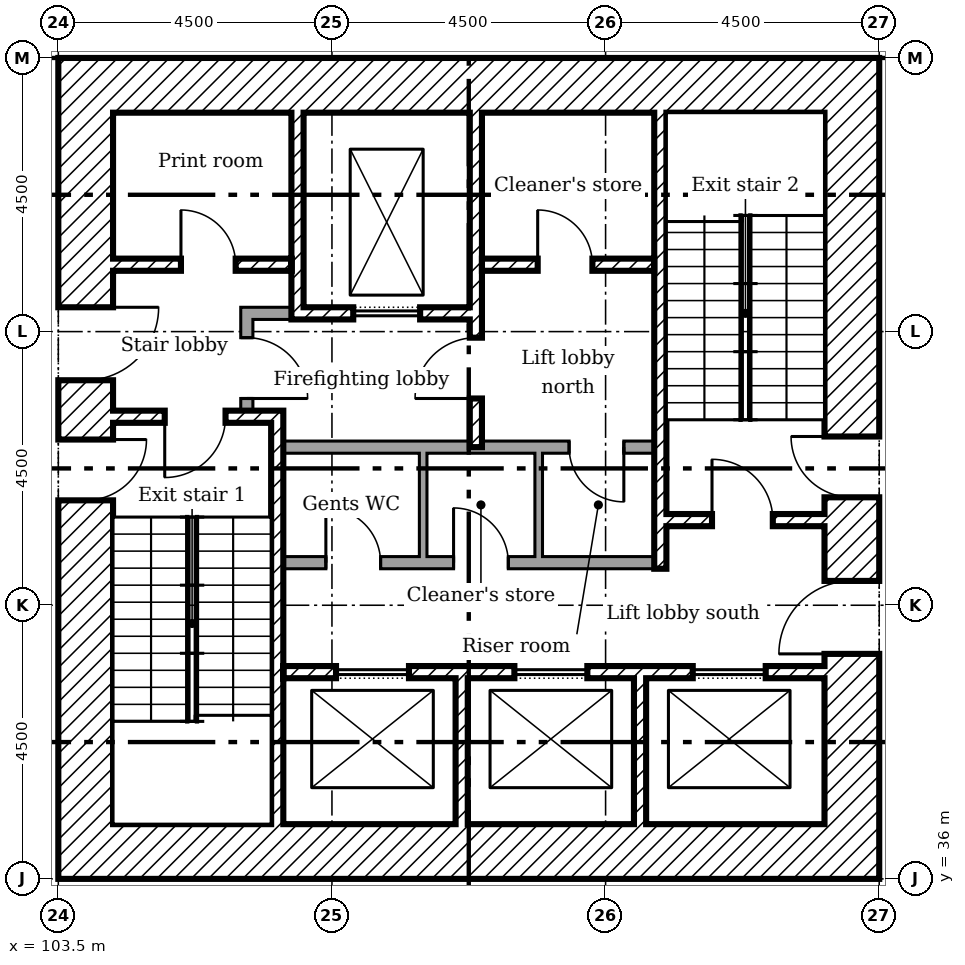
"""IFC4 building model, lengths in metres.
Left out: names, types, materials, properties, quantities, classifications, styles, units other than length and angle.
Written with IfcOpenShell. Run it as: python <this file> out.ifc"""

import sys

from ifc_helpers import new_model, si_unit, direction, frame, frame_2d, origin, place, context, subcontext, project, spatial, rectangle, extrude, element, fill, save


model = new_model("IFC4")
c1 = context("Model", 3, precision=1e-05, world=origin(), true_north=direction((0.0, 1.0)))
c2 = subcontext(c1, "Body", "Model", "MODEL_VIEW")
j1 = project(units=[si_unit("LENGTHUNIT", "METRE"), si_unit("PLANEANGLEUNIT", "RADIAN")], contexts=[c1])
p1 = place(None, origin())
s1 = spatial("IfcSite", under=j1, at=p1, CompositionType="ELEMENT")
p2 = place(p1, origin())
s2 = spatial("IfcBuilding", under=s1, at=p2, CompositionType="ELEMENT")
p3 = place(p2, frame((0.0, 0.0, 25.4)))
s3 = spatial("IfcBuildingStorey", under=s2, at=p3, CompositionType="ELEMENT", Elevation=25.4)
p4 = place(p3, frame((116.55, 36.0, 0.0), z_axis=(0.0, 0.0, 1.0), x_axis=(0.0, 1.0, 0.0)))
e1 = element("IfcWall", 1, at=p4, inside=s3, PredefinedType="SHEAR", context=c2, shape_type="SweptSolid", body=[
    extrude(rectangle(XDim=13.5, YDim=0.9, at=frame_2d((6.75, 0.0))), origin(), (0.0, 0.0, 1.0), 4.125),
])
p5 = place(p4, frame((3.7, 0.0, 0.0)))
e2 = element("IfcOpeningElement", 2, at=p5, cuts=e1, PredefinedType="OPENING", context=c2, shape_type="SweptSolid", body=[
    extrude(rectangle(XDim=1.2, YDim=2.1, at=frame_2d((0.6, 1.05))), frame((0.0, 0.46, 0.0), z_axis=(0.0, -1.0, 0.0), x_axis=(1.0, 0.0, 0.0)), (0.0, 0.0, 1.0), 0.92),
])
p6 = place(p4, frame((6.275, 0.0, 0.0)))
e3 = element("IfcOpeningElement", 3, at=p6, cuts=e1, PredefinedType="OPENING", context=c2, shape_type="SweptSolid", body=[
    extrude(rectangle(XDim=1.0, YDim=2.1, at=frame_2d((0.5, 1.05))), frame((0.0, 0.46, 0.0), z_axis=(0.0, -1.0, 0.0), x_axis=(1.0, 0.0, 0.0)), (0.0, 0.0, 1.0), 0.92),
])
for number, where in (
    (4, (104.4, 49.05, 0.0)),
    (5, (104.4, 36.45, 0.0)),
):
    element("IfcWall", number, at=place(p3, frame(where)), inside=s3, PredefinedType="SHEAR", context=c2, shape_type="SweptSolid", body=[
        extrude(rectangle(XDim=11.7, YDim=0.9, at=frame_2d((5.85, 0.0))), origin(), (0.0, 0.0, 1.0), 4.125),
    ])
p7 = place(p3, frame((103.95, 36.0, 0.0), z_axis=(0.0, 0.0, 1.0), x_axis=(0.0, 1.0, 0.0)))
e6 = element("IfcWall", 6, at=p7, inside=s3, PredefinedType="SHEAR", context=c2, shape_type="SweptSolid", body=[
    extrude(rectangle(XDim=13.5, YDim=0.9, at=frame_2d((6.75, 0.0))), origin(), (0.0, 0.0, 1.0), 4.125),
])
p8 = place(p7, frame((8.2, 0.0, 0.0)))
e7 = element("IfcOpeningElement", 7, at=p8, cuts=e6, PredefinedType="OPENING", context=c2, shape_type="SweptSolid", body=[
    extrude(rectangle(XDim=1.2, YDim=2.1, at=frame_2d((0.6, 1.05))), frame((0.0, 0.46, 0.0), z_axis=(0.0, -1.0, 0.0), x_axis=(1.0, 0.0, 0.0)), (0.0, 0.0, 1.0), 0.92),
])
p9 = place(p7, frame((6.225, 0.0, 0.0)))
e8 = element("IfcOpeningElement", 8, at=p9, cuts=e6, PredefinedType="OPENING", context=c2, shape_type="SweptSolid", body=[
    extrude(rectangle(XDim=1.0, YDim=2.1, at=frame_2d((0.5, 1.05))), frame((0.0, 0.46, 0.0), z_axis=(0.0, -1.0, 0.0), x_axis=(1.0, 0.0, 0.0)), (0.0, 0.0, 1.0), 0.92),
])
p10 = place(p3, frame((107.433, 48.6, 0.0), z_axis=(0.0, 0.0, 1.0), x_axis=(0.0, -1.0, 0.0)))
e9 = element("IfcWall", 9, at=p10, inside=s3, PredefinedType="SHEAR", context=c2, shape_type="SweptSolid", body=[
    extrude(rectangle(XDim=3.4, YDim=0.2, at=frame_2d((1.7, 0.0))), origin(), (0.0, 0.0, 1.0), 4.125),
])
p11 = place(p3, frame((110.367, 48.6, 0.0), z_axis=(0.0, 0.0, 1.0), x_axis=(0.0, -1.0, 0.0)))
e10 = element("IfcWall", 10, at=p11, inside=s3, PredefinedType="SHEAR", context=c2, shape_type="SweptSolid", body=[
    extrude(rectangle(XDim=5.5, YDim=0.2, at=frame_2d((2.75, 0.0))), origin(), (0.0, 0.0, 1.0), 4.125),
])
p12 = place(p11, frame((3.7, 0.0, 0.0)))
e11 = element("IfcOpeningElement", 11, at=p12, cuts=e10, PredefinedType="OPENING", context=c2, shape_type="SweptSolid", body=[
    extrude(rectangle(XDim=1.0, YDim=2.1, at=frame_2d((0.5, 1.05))), frame((0.0, 0.11, 0.0), z_axis=(0.0, -1.0, 0.0), x_axis=(1.0, 0.0, 0.0)), (0.0, 0.0, 1.0), 0.22),
])
for number, where, z_axis, x_axis in (
    (12, (110.133, 36.9, 0.0), (0.0, 0.0, 1.0), (0.0, 1.0, 0.0)),
    (13, (113.067, 36.9, 0.0), (0.0, 0.0, 1.0), (0.0, 1.0, 0.0)),
):
    element("IfcWall", number, at=place(p3, frame(where, z_axis=z_axis, x_axis=x_axis)), inside=s3, PredefinedType="SHEAR", context=c2, shape_type="SweptSolid", body=[
        extrude(rectangle(XDim=2.4, YDim=0.2, at=frame_2d((1.2, 0.0))), origin(), (0.0, 0.0, 1.0), 4.125),
    ])
p13 = place(p3, frame((106.5, 45.3, 0.0)))
e14 = element("IfcWall", 14, at=p13, inside=s3, PredefinedType="PARTITIONING", context=c2, shape_type="SweptSolid", body=[
    extrude(rectangle(XDim=0.833, YDim=0.2, at=frame_2d((0.417, 0.0))), origin(), (0.0, 0.0, 1.0), 4.125),
])
p14 = place(p3, frame((106.6, 43.7, 0.0), z_axis=(0.0, 0.0, 1.0), x_axis=(0.0, 1.0, 0.0)))
e15 = element("IfcWall", 15, at=p14, inside=s3, PredefinedType="PARTITIONING", context=c2, shape_type="SweptSolid", body=[
    extrude(rectangle(XDim=1.5, YDim=0.2, at=frame_2d((0.75, 0.0))), origin(), (0.0, 0.0, 1.0), 4.125),
])
p15 = place(p14, frame((0.2, 0.0, 0.0)))
e16 = element("IfcOpeningElement", 16, at=p15, cuts=e15, PredefinedType="OPENING", context=c2, shape_type="SweptSolid", body=[
    extrude(rectangle(XDim=1.0, YDim=2.1, at=frame_2d((0.5, 1.05))), frame((0.0, 0.11, 0.0), z_axis=(0.0, -1.0, 0.0), x_axis=(1.0, 0.0, 0.0)), (0.0, 0.0, 1.0), 0.22),
])
p16 = place(p3, frame((104.4, 46.1, 0.0)))
e17 = element("IfcWall", 17, at=p16, inside=s3, PredefinedType="SHEAR", context=c2, shape_type="SweptSolid", body=[
    extrude(rectangle(XDim=2.933, YDim=0.2, at=frame_2d((1.467, 0.0))), origin(), (0.0, 0.0, 1.0), 4.125),
])
p17 = place(p16, frame((1.117, 0.0, 0.0)))
e18 = element("IfcOpeningElement", 18, at=p17, cuts=e17, PredefinedType="OPENING", context=c2, shape_type="SweptSolid", body=[
    extrude(rectangle(XDim=0.9, YDim=2.1, at=frame_2d((0.45, 1.05))), frame((0.0, 0.11, 0.0), z_axis=(0.0, -1.0, 0.0), x_axis=(1.0, 0.0, 0.0)), (0.0, 0.0, 1.0), 0.22),
])
p18 = place(p3, frame((110.467, 46.1, 0.0)))
e19 = element("IfcWall", 19, at=p18, inside=s3, PredefinedType="SHEAR", context=c2, shape_type="SweptSolid", body=[
    extrude(rectangle(XDim=2.833, YDim=0.2, at=frame_2d((1.417, 0.0))), origin(), (0.0, 0.0, 1.0), 4.125),
])
p19 = place(p18, frame((0.917, 0.0, 0.0)))
e20 = element("IfcOpeningElement", 20, at=p19, cuts=e19, PredefinedType="OPENING", context=c2, shape_type="SweptSolid", body=[
    extrude(rectangle(XDim=0.9, YDim=2.1, at=frame_2d((0.45, 1.05))), frame((0.0, 0.11, 0.0), z_axis=(0.0, -1.0, 0.0), x_axis=(1.0, 0.0, 0.0)), (0.0, 0.0, 1.0), 0.22),
])
p20 = place(p3, frame((107.533, 45.3, 0.0)))
e21 = element("IfcWall", 21, at=p20, inside=s3, PredefinedType="SHEAR", context=c2, shape_type="SweptSolid", body=[
    extrude(rectangle(XDim=2.733, YDim=0.2, at=frame_2d((1.367, 0.0))), origin(), (0.0, 0.0, 1.0), 4.125),
])
p21 = place(p20, frame((0.817, 0.0, 0.0)))
e22 = element("IfcOpeningElement", 22, at=p21, cuts=e21, PredefinedType="OPENING", context=c2, shape_type="SweptSolid", body=[
    extrude(rectangle(XDim=1.1, YDim=2.1, at=frame_2d((0.55, 1.05))), frame((0.0, 0.11, 0.0), z_axis=(0.0, -1.0, 0.0), x_axis=(1.0, 0.0, 0.0)), (0.0, 0.0, 1.0), 0.22),
])
p22 = place(p3, frame((107.2, 39.4, 0.0)))
e23 = element("IfcWall", 23, at=p22, inside=s3, PredefinedType="SHEAR", context=c2, shape_type="SweptSolid", body=[
    extrude(rectangle(XDim=8.9, YDim=0.2, at=frame_2d((4.45, 0.0))), origin(), (0.0, 0.0, 1.0), 4.125),
])
p23 = place(p22, frame((0.867, 0.0, 0.0)))
e24 = element("IfcOpeningElement", 24, at=p23, cuts=e23, PredefinedType="OPENING", context=c2, shape_type="SweptSolid", body=[
    extrude(rectangle(XDim=1.2, YDim=2.1, at=frame_2d((0.6, 1.05))), frame((0.0, 0.11, 0.0), z_axis=(0.0, -1.0, 0.0), x_axis=(1.0, 0.0, 0.0)), (0.0, 0.0, 1.0), 0.22),
])
p24 = place(p22, frame((3.8, 0.0, 0.0)))
e25 = element("IfcOpeningElement", 25, at=p24, cuts=e23, PredefinedType="OPENING", context=c2, shape_type="SweptSolid", body=[
    extrude(rectangle(XDim=1.2, YDim=2.1, at=frame_2d((0.6, 1.05))), frame((0.0, 0.11, 0.0), z_axis=(0.0, -1.0, 0.0), x_axis=(1.0, 0.0, 0.0)), (0.0, 0.0, 1.0), 0.22),
])
p25 = place(p22, frame((6.733, 0.0, 0.0)))
e26 = element("IfcOpeningElement", 26, at=p25, cuts=e23, PredefinedType="OPENING", context=c2, shape_type="SweptSolid", body=[
    extrude(rectangle(XDim=1.2, YDim=2.1, at=frame_2d((0.6, 1.05))), frame((0.0, 0.11, 0.0), z_axis=(0.0, -1.0, 0.0), x_axis=(1.0, 0.0, 0.0)), (0.0, 0.0, 1.0), 0.22),
])
p26 = place(p3, frame((107.1, 36.9, 0.0), z_axis=(0.0, 0.0, 1.0), x_axis=(0.0, 1.0, 0.0)))
e27 = element("IfcWall", 27, at=p26, inside=s3, PredefinedType="SHEAR", context=c2, shape_type="SweptSolid", body=[
    extrude(rectangle(XDim=6.8, YDim=0.2, at=frame_2d((3.4, 0.0))), origin(), (0.0, 0.0, 1.0), 4.125),
])
p27 = place(p3, frame((104.4, 43.6, 0.0)))
e28 = element("IfcWall", 28, at=p27, inside=s3, PredefinedType="SHEAR", context=c2, shape_type="SweptSolid", body=[
    extrude(rectangle(XDim=2.6, YDim=0.2, at=frame_2d((1.3, 0.0))), origin(), (0.0, 0.0, 1.0), 4.125),
])
p28 = place(p27, frame((0.85, 0.0, 0.0)))
e29 = element("IfcOpeningElement", 29, at=p28, cuts=e28, PredefinedType="OPENING", context=c2, shape_type="SweptSolid", body=[
    extrude(rectangle(XDim=1.0, YDim=2.1, at=frame_2d((0.5, 1.05))), frame((0.0, 0.11, 0.0), z_axis=(0.0, -1.0, 0.0), x_axis=(1.0, 0.0, 0.0)), (0.0, 0.0, 1.0), 0.22),
])
p29 = place(p3, frame((113.5, 41.9, 0.0)))
e30 = element("IfcWall", 30, at=p29, inside=s3, PredefinedType="SHEAR", context=c2, shape_type="SweptSolid", body=[
    extrude(rectangle(XDim=2.6, YDim=0.2, at=frame_2d((1.3, 0.0))), origin(), (0.0, 0.0, 1.0), 4.125),
])
p30 = place(p29, frame((0.75, 0.0, 0.0)))
e31 = element("IfcOpeningElement", 31, at=p30, cuts=e30, PredefinedType="OPENING", context=c2, shape_type="SweptSolid", body=[
    extrude(rectangle(XDim=1.0, YDim=2.1, at=frame_2d((0.5, 1.05))), frame((0.0, 0.11, 0.0), z_axis=(0.0, -1.0, 0.0), x_axis=(1.0, 0.0, 0.0)), (0.0, 0.0, 1.0), 0.22),
])
p31 = place(p3, frame((113.4, 41.1, 0.0), z_axis=(0.0, 0.0, 1.0), x_axis=(0.0, 1.0, 0.0)))
e32 = element("IfcWall", 32, at=p31, inside=s3, PredefinedType="SHEAR", context=c2, shape_type="SweptSolid", body=[
    extrude(rectangle(XDim=7.5, YDim=0.2, at=frame_2d((3.75, 0.0))), origin(), (0.0, 0.0, 1.0), 4.125),
])
p32 = place(p3, frame((107.2, 43.1, 0.0)))
e33 = element("IfcWall", 33, at=p32, inside=s3, PredefinedType="PARTITIONING", context=c2, shape_type="SweptSolid", body=[
    extrude(rectangle(XDim=6.1, YDim=0.2, at=frame_2d((3.05, 0.0))), origin(), (0.0, 0.0, 1.0), 4.125),
])
p33 = place(p32, frame((4.7, 0.0, 0.0)))
e34 = element("IfcOpeningElement", 34, at=p33, cuts=e33, PredefinedType="OPENING", context=c2, shape_type="SweptSolid", body=[
    extrude(rectangle(XDim=0.9, YDim=2.1, at=frame_2d((0.45, 1.05))), frame((0.0, 0.11, 0.0), z_axis=(0.0, -1.0, 0.0), x_axis=(1.0, 0.0, 0.0)), (0.0, 0.0, 1.0), 0.22),
])
p34 = place(p3, frame((107.2, 41.2, 0.0)))
e35 = element("IfcWall", 35, at=p34, inside=s3, PredefinedType="PARTITIONING", context=c2, shape_type="SweptSolid", body=[
    extrude(rectangle(XDim=6.1, YDim=0.2, at=frame_2d((3.05, 0.0))), origin(), (0.0, 0.0, 1.0), 4.125),
])
p35 = place(p34, frame((0.7, 0.0, 0.0)))
e36 = element("IfcOpeningElement", 36, at=p35, cuts=e35, PredefinedType="OPENING", context=c2, shape_type="SweptSolid", body=[
    extrude(rectangle(XDim=0.9, YDim=2.1, at=frame_2d((0.45, 1.05))), frame((0.0, 0.11, 0.0), z_axis=(0.0, -1.0, 0.0), x_axis=(1.0, 0.0, 0.0)), (0.0, 0.0, 1.0), 0.22),
])
p36 = place(p34, frame((2.8, 0.0, 0.0)))
e37 = element("IfcOpeningElement", 37, at=p36, cuts=e35, PredefinedType="OPENING", context=c2, shape_type="SweptSolid", body=[
    extrude(rectangle(XDim=0.9, YDim=2.1, at=frame_2d((0.45, 1.05))), frame((0.0, 0.11, 0.0), z_axis=(0.0, -1.0, 0.0), x_axis=(1.0, 0.0, 0.0)), (0.0, 0.0, 1.0), 0.22),
])
for number, where, z_axis, x_axis in (
    (38, (109.5, 41.3, 0.0), (0.0, 0.0, 1.0), (0.0, 1.0, 0.0)),
    (39, (111.4, 41.3, 0.0), (0.0, 0.0, 1.0), (0.0, 1.0, 0.0)),
):
    element("IfcWall", number, at=place(p3, frame(where, z_axis=z_axis, x_axis=x_axis)), inside=s3, PredefinedType="PARTITIONING", context=c2, shape_type="SweptSolid", body=[
        extrude(rectangle(XDim=1.7, YDim=0.125, at=frame_2d((0.85, 0.0))), origin(), (0.0, 0.0, 1.0), 4.125),
    ])
p37 = place(p8, frame((1.2, 0.0, 0.0), x_axis=(-1.0, 0.0, 0.0)))
e40 = element("IfcDoor", 40, at=p37, inside=s3, OperationType="SINGLE_SWING_RIGHT", PredefinedType="DOOR", context=c2, shape_type="SweptSolid", body=[
    extrude(rectangle(XDim=1.2, YDim=2.1, at=frame_2d((0.6, 1.05))), frame((0.0, 0.025, 0.0), z_axis=(0.0, -1.0, 0.0), x_axis=(1.0, 0.0, 0.0)), (0.0, 0.0, 1.0), 0.05),
])
fill(e7, e40)
p38 = place(p5, origin())
e41 = element("IfcDoor", 41, at=p38, inside=s3, OperationType="SINGLE_SWING_RIGHT", PredefinedType="DOOR", context=c2, shape_type="SweptSolid", body=[
    extrude(rectangle(XDim=1.2, YDim=2.1, at=frame_2d((0.6, 1.05))), frame((0.0, 0.025, 0.0), z_axis=(0.0, -1.0, 0.0), x_axis=(1.0, 0.0, 0.0)), (0.0, 0.0, 1.0), 0.05),
])
fill(e2, e41)
p39 = place(p28, frame((1.0, 0.0, 0.0), x_axis=(-1.0, 0.0, 0.0)))
e42 = element("IfcDoor", 42, at=p39, inside=s3, OperationType="SINGLE_SWING_LEFT", PredefinedType="DOOR", context=c2, shape_type="SweptSolid", body=[
    extrude(rectangle(XDim=1.0, YDim=2.1, at=frame_2d((0.5, 1.05))), frame((0.0, 0.025, 0.0), z_axis=(0.0, -1.0, 0.0), x_axis=(1.0, 0.0, 0.0)), (0.0, 0.0, 1.0), 0.05),
])
fill(e29, e42)
p40 = place(p9, frame((1.0, 0.0, 0.0), x_axis=(-1.0, 0.0, 0.0)))
e43 = element("IfcDoor", 43, at=p40, inside=s3, OperationType="SINGLE_SWING_RIGHT", PredefinedType="DOOR", context=c2, shape_type="SweptSolid", body=[
    extrude(rectangle(XDim=1.0, YDim=2.1, at=frame_2d((0.5, 1.05))), frame((0.0, 0.025, 0.0), z_axis=(0.0, -1.0, 0.0), x_axis=(1.0, 0.0, 0.0)), (0.0, 0.0, 1.0), 0.05),
])
fill(e8, e43)
p41 = place(p30, origin())
e44 = element("IfcDoor", 44, at=p41, inside=s3, OperationType="SINGLE_SWING_RIGHT", PredefinedType="DOOR", context=c2, shape_type="SweptSolid", body=[
    extrude(rectangle(XDim=1.0, YDim=2.1, at=frame_2d((0.5, 1.05))), frame((0.0, 0.025, 0.0), z_axis=(0.0, -1.0, 0.0), x_axis=(1.0, 0.0, 0.0)), (0.0, 0.0, 1.0), 0.05),
])
fill(e31, e44)
p42 = place(p6, origin())
e45 = element("IfcDoor", 45, at=p42, inside=s3, OperationType="SINGLE_SWING_LEFT", PredefinedType="DOOR", context=c2, shape_type="SweptSolid", body=[
    extrude(rectangle(XDim=1.0, YDim=2.1, at=frame_2d((0.5, 1.05))), frame((0.0, 0.025, 0.0), z_axis=(0.0, -1.0, 0.0), x_axis=(1.0, 0.0, 0.0)), (0.0, 0.0, 1.0), 0.05),
])
fill(e3, e45)
p43 = place(p12, frame((1.0, 0.0, 0.0), x_axis=(-1.0, 0.0, 0.0)))
e46 = element("IfcDoor", 46, at=p43, inside=s3, OperationType="SINGLE_SWING_RIGHT", PredefinedType="DOOR", context=c2, shape_type="SweptSolid", body=[
    extrude(rectangle(XDim=1.0, YDim=2.1, at=frame_2d((0.5, 1.05))), frame((0.0, 0.025, 0.0), z_axis=(0.0, -1.0, 0.0), x_axis=(1.0, 0.0, 0.0)), (0.0, 0.0, 1.0), 0.05),
])
fill(e11, e46)
p44 = place(p15, frame((1.0, 0.0, 0.0), x_axis=(-1.0, 0.0, 0.0)))
e47 = element("IfcDoor", 47, at=p44, inside=s3, OperationType="SINGLE_SWING_LEFT", PredefinedType="DOOR", context=c2, shape_type="SweptSolid", body=[
    extrude(rectangle(XDim=1.0, YDim=2.1, at=frame_2d((0.5, 1.05))), frame((0.0, 0.025, 0.0), z_axis=(0.0, -1.0, 0.0), x_axis=(1.0, 0.0, 0.0)), (0.0, 0.0, 1.0), 0.05),
])
fill(e16, e47)
p45 = place(p17, origin())
e48 = element("IfcDoor", 48, at=p45, inside=s3, OperationType="SINGLE_SWING_RIGHT", PredefinedType="DOOR", context=c2, shape_type="SweptSolid", body=[
    extrude(rectangle(XDim=0.9, YDim=2.1, at=frame_2d((0.45, 1.05))), frame((0.0, 0.025, 0.0), z_axis=(0.0, -1.0, 0.0), x_axis=(1.0, 0.0, 0.0)), (0.0, 0.0, 1.0), 0.05),
])
fill(e18, e48)
p46 = place(p19, origin())
e49 = element("IfcDoor", 49, at=p46, inside=s3, OperationType="SINGLE_SWING_RIGHT", PredefinedType="DOOR", context=c2, shape_type="SweptSolid", body=[
    extrude(rectangle(XDim=0.9, YDim=2.1, at=frame_2d((0.45, 1.05))), frame((0.0, 0.025, 0.0), z_axis=(0.0, -1.0, 0.0), x_axis=(1.0, 0.0, 0.0)), (0.0, 0.0, 1.0), 0.05),
])
fill(e20, e49)
p47 = place(p35, origin())
e50 = element("IfcDoor", 50, at=p47, inside=s3, OperationType="SINGLE_SWING_RIGHT", PredefinedType="DOOR", context=c2, shape_type="SweptSolid", body=[
    extrude(rectangle(XDim=0.9, YDim=2.1, at=frame_2d((0.45, 1.05))), frame((0.0, 0.025, 0.0), z_axis=(0.0, -1.0, 0.0), x_axis=(1.0, 0.0, 0.0)), (0.0, 0.0, 1.0), 0.05),
])
fill(e36, e50)
p48 = place(p36, origin())
e51 = element("IfcDoor", 51, at=p48, inside=s3, OperationType="SINGLE_SWING_RIGHT", PredefinedType="DOOR", context=c2, shape_type="SweptSolid", body=[
    extrude(rectangle(XDim=0.9, YDim=2.1, at=frame_2d((0.45, 1.05))), frame((0.0, 0.025, 0.0), z_axis=(0.0, -1.0, 0.0), x_axis=(1.0, 0.0, 0.0)), (0.0, 0.0, 1.0), 0.05),
])
fill(e37, e51)
p49 = place(p33, frame((0.9, 0.0, 0.0), x_axis=(-1.0, 0.0, 0.0)))
e52 = element("IfcDoor", 52, at=p49, inside=s3, OperationType="SINGLE_SWING_RIGHT", PredefinedType="DOOR", context=c2, shape_type="SweptSolid", body=[
    extrude(rectangle(XDim=0.9, YDim=2.1, at=frame_2d((0.45, 1.05))), frame((0.0, 0.025, 0.0), z_axis=(0.0, -1.0, 0.0), x_axis=(1.0, 0.0, 0.0)), (0.0, 0.0, 1.0), 0.05),
])
fill(e34, e52)
p50 = place(p21, origin())
e53 = element("IfcDoor", 53, at=p50, inside=s3, OperationType="SLIDING_TO_LEFT", PredefinedType="DOOR", context=c2, shape_type="SweptSolid", body=[
    extrude(rectangle(XDim=1.1, YDim=2.1, at=frame_2d((0.55, 1.05))), frame((0.0, 0.025, 0.0), z_axis=(0.0, -1.0, 0.0), x_axis=(1.0, 0.0, 0.0)), (0.0, 0.0, 1.0), 0.05),
])
fill(e22, e53)
p51 = place(p23, origin())
e54 = element("IfcDoor", 54, at=p51, inside=s3, OperationType="SLIDING_TO_LEFT", PredefinedType="DOOR", context=c2, shape_type="SweptSolid", body=[
    extrude(rectangle(XDim=1.2, YDim=2.1, at=frame_2d((0.6, 1.05))), frame((0.0, 0.025, 0.0), z_axis=(0.0, -1.0, 0.0), x_axis=(1.0, 0.0, 0.0)), (0.0, 0.0, 1.0), 0.05),
])
fill(e24, e54)
p52 = place(p24, origin())
e55 = element("IfcDoor", 55, at=p52, inside=s3, OperationType="SLIDING_TO_LEFT", PredefinedType="DOOR", context=c2, shape_type="SweptSolid", body=[
    extrude(rectangle(XDim=1.2, YDim=2.1, at=frame_2d((0.6, 1.05))), frame((0.0, 0.025, 0.0), z_axis=(0.0, -1.0, 0.0), x_axis=(1.0, 0.0, 0.0)), (0.0, 0.0, 1.0), 0.05),
])
fill(e25, e55)
p53 = place(p25, origin())
e56 = element("IfcDoor", 56, at=p53, inside=s3, OperationType="SLIDING_TO_LEFT", PredefinedType="DOOR", context=c2, shape_type="SweptSolid", body=[
    extrude(rectangle(XDim=1.2, YDim=2.1, at=frame_2d((0.6, 1.05))), frame((0.0, 0.025, 0.0), z_axis=(0.0, -1.0, 0.0), x_axis=(1.0, 0.0, 0.0)), (0.0, 0.0, 1.0), 0.05),
])
fill(e26, e56)
save(model, sys.argv[1])
